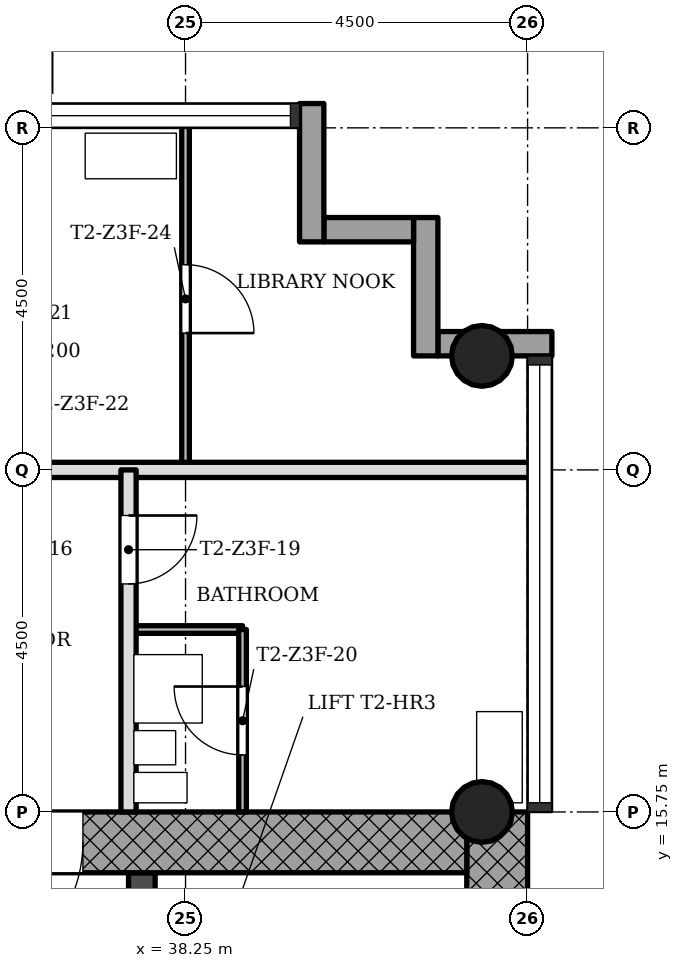
"""IFC4 building model, lengths in metres.
Left out: names, types, materials, properties, quantities, classifications, styles, units other than length and angle.
Written with IfcOpenShell. Run it as: python <this file> out.ifc"""

import sys

from ifc_helpers import new_model, si_unit, direction, frame, frame_2d, origin, origin_2d, place, context, subcontext, project, spatial, rectangle, hollow_circle, extrude, element, fill, save


model = new_model("IFC4")
c1 = context("Model", 3, precision=1e-05, world=origin(), true_north=direction((0.0, 1.0)))
c2 = subcontext(c1, "Body", "Model", "MODEL_VIEW")
j1 = project(units=[si_unit("LENGTHUNIT", "METRE"), si_unit("PLANEANGLEUNIT", "RADIAN")], contexts=[c1])
p1 = place(None, origin())
s1 = spatial("IfcSite", under=j1, at=p1, CompositionType="ELEMENT")
p2 = place(p1, origin())
s2 = spatial("IfcBuilding", under=s1, at=p2, CompositionType="ELEMENT")
p3 = place(p2, frame((0.0, 0.0, 167.7)))
s3 = spatial("IfcBuildingStorey", under=s2, at=p3, CompositionType="ELEMENT", Elevation=167.7)
p4 = place(p3, frame((42.35, 7.55, 0.0), z_axis=(0.0, 0.0, 1.0), x_axis=(0.0, 1.0, 0.0)))
e1 = element("IfcWall", 1, at=p4, inside=s3, PredefinedType="SHEAR", context=c2, shape_type="SweptSolid", body=[
    extrude(rectangle(XDim=8.2, YDim=0.8, at=frame_2d((4.1, 0.0))), origin(), (0.0, 0.0, 1.0), 3.4),
])
p5 = place(p3, frame((41.95, 15.35, 0.0), z_axis=(0.0, 0.0, 1.0), x_axis=(-1.0, 0.0, 0.0)))
e2 = element("IfcWall", 2, at=p5, inside=s3, PredefinedType="SHEAR", context=c2, shape_type="SweptSolid", body=[
    extrude(rectangle(XDim=12.7, YDim=0.8, at=frame_2d((6.35, 0.0))), origin(), (0.0, 0.0, 1.0), 3.4),
])
p6 = place(p5, frame((5.05, 0.0, 0.0)))
e3 = element("IfcOpeningElement", 3, at=p6, cuts=e2, PredefinedType="OPENING", context=c2, shape_type="SweptSolid", body=[
    extrude(rectangle(XDim=1.8, YDim=2.1, at=frame_2d((0.9, 1.05))), frame((0.0, 0.41, 0.0), z_axis=(0.0, -1.0, 0.0), x_axis=(1.0, 0.0, 0.0)), (0.0, 0.0, 1.0), 0.82),
])
p7 = place(p3, frame((37.675, 7.55, 0.0), z_axis=(0.0, 0.0, 1.0), x_axis=(0.0, 1.0, 0.0)))
e4 = element("IfcWall", 4, at=p7, inside=s3, PredefinedType="SHEAR", context=c2, shape_type="SweptSolid", body=[
    extrude(rectangle(XDim=7.4, YDim=0.35, at=frame_2d((3.7, 0.0))), origin(), (0.0, 0.0, 1.0), 3.4),
])
p8 = place(p7, frame((0.95, 0.0, 0.0)))
e5 = element("IfcOpeningElement", 5, at=p8, cuts=e4, PredefinedType="OPENING", context=c2, shape_type="SweptSolid", body=[
    extrude(rectangle(XDim=1.1, YDim=2.1, at=frame_2d((0.55, 1.05))), frame((0.0, 0.185, 0.0), z_axis=(0.0, -1.0, 0.0), x_axis=(1.0, 0.0, 0.0)), (0.0, 0.0, 1.0), 0.37),
])
p9 = place(p7, frame((3.15, 0.0, 0.0)))
e6 = element("IfcOpeningElement", 6, at=p9, cuts=e4, PredefinedType="OPENING", context=c2, shape_type="SweptSolid", body=[
    extrude(rectangle(XDim=1.1, YDim=2.1, at=frame_2d((0.55, 1.05))), frame((0.0, 0.185, 0.0), z_axis=(0.0, -1.0, 0.0), x_axis=(1.0, 0.0, 0.0)), (0.0, 0.0, 1.0), 0.37),
])
p10 = place(p7, frame((5.35, 0.0, 0.0)))
e7 = element("IfcOpeningElement", 7, at=p10, cuts=e4, PredefinedType="OPENING", context=c2, shape_type="SweptSolid", body=[
    extrude(rectangle(XDim=1.1, YDim=2.1, at=frame_2d((0.55, 1.05))), frame((0.0, 0.185, 0.0), z_axis=(0.0, -1.0, 0.0), x_axis=(1.0, 0.0, 0.0)), (0.0, 0.0, 1.0), 0.37),
])
for number, where, z_axis, x_axis in (
    (8, (42.15, 15.75, 0.0), (0.0, 0.0, 1.0), (1.0, 0.0, 0.0)),
    (9, (42.15, 21.75, 0.0), (0.0, 0.0, 1.0), (1.0, 0.0, 0.0)),
):
    element("IfcColumn", number, at=place(p3, frame(where, z_axis=z_axis, x_axis=x_axis)), inside=s3, PredefinedType="COLUMN", context=c2, shape_type="SweptSolid", body=[
        extrude(hollow_circle(Radius=0.4, WallThickness=0.028, at=origin_2d()), origin(), (0.0, 0.0, 1.0), 3.4),
    ])
p11 = place(p3, frame((43.07, 21.91, -0.3), z_axis=(0.0, 0.0, 1.0), x_axis=(-1.0, 0.0, 0.0)))
e10 = element("IfcWall", 10, at=p11, inside=s3, PredefinedType="STANDARD", context=c2, shape_type="SweptSolid", body=[
    extrude(rectangle(XDim=1.5, YDim=0.32, at=frame_2d((0.75, 0.0))), origin(), (0.0, 0.0, 1.0), 3.4),
])
p12 = place(p3, frame((41.41, 21.75, -0.3), z_axis=(0.0, 0.0, 1.0), x_axis=(0.0, 1.0, 0.0)))
e11 = element("IfcWall", 11, at=p12, inside=s3, PredefinedType="STANDARD", context=c2, shape_type="SweptSolid", body=[
    extrude(rectangle(XDim=1.82, YDim=0.32, at=frame_2d((0.91, 0.0))), origin(), (0.0, 0.0, 1.0), 3.4),
])
p13 = place(p3, frame((41.25, 23.41, -0.3), z_axis=(0.0, 0.0, 1.0), x_axis=(-1.0, 0.0, 0.0)))
e12 = element("IfcWall", 12, at=p13, inside=s3, PredefinedType="STANDARD", context=c2, shape_type="SweptSolid", body=[
    extrude(rectangle(XDim=1.18, YDim=0.32, at=frame_2d((0.59, 0.0))), origin(), (0.0, 0.0, 1.0), 3.4),
])
p14 = place(p3, frame((39.91, 23.25, -0.3), z_axis=(0.0, 0.0, 1.0), x_axis=(0.0, 1.0, 0.0)))
e13 = element("IfcWall", 13, at=p14, inside=s3, PredefinedType="STANDARD", context=c2, shape_type="SweptSolid", body=[
    extrude(rectangle(XDim=1.82, YDim=0.32, at=frame_2d((0.91, 0.0))), origin(), (0.0, 0.0, 1.0), 3.4),
])
p15 = place(p3, frame((39.0, 18.15, 0.0), z_axis=(0.0, 0.0, 1.0), x_axis=(-1.0, 0.0, 0.0)))
e14 = element("IfcWall", 14, at=p15, inside=s3, PredefinedType="PARTITIONING", context=c2, shape_type="SweptSolid", body=[
    extrude(rectangle(XDim=1.5, YDim=0.1, at=frame_2d((0.75, 0.0))), origin(), (0.0, 0.0, 1.0), 3.0),
])
p16 = place(p3, frame((42.85, 20.25, 0.0), z_axis=(0.0, 0.0, 1.0), x_axis=(-1.0, 0.0, 0.0)))
e15 = element("IfcWall", 15, at=p16, inside=s3, PredefinedType="SOLIDWALL", context=c2, shape_type="SweptSolid", body=[
    extrude(rectangle(XDim=13.7, YDim=0.2, at=frame_2d((6.85, 0.0))), origin(), (0.0, 0.0, 1.0), 3.0),
])
p17 = place(p16, frame((6.4, 0.0, 0.0)))
e16 = element("IfcOpeningElement", 16, at=p17, cuts=e15, PredefinedType="OPENING", context=c2, shape_type="SweptSolid", body=[
    extrude(rectangle(XDim=0.9, YDim=2.1, at=frame_2d((0.45, 1.05))), frame((0.0, 0.11, 0.0), z_axis=(0.0, -1.0, 0.0), x_axis=(1.0, 0.0, 0.0)), (0.0, 0.0, 1.0), 0.22),
])
p18 = place(p3, frame((39.0, 15.75, 0.0), z_axis=(0.0, 0.0, 1.0), x_axis=(0.0, 1.0, 0.0)))
e17 = element("IfcWall", 17, at=p18, inside=s3, PredefinedType="PARTITIONING", context=c2, shape_type="SweptSolid", body=[
    extrude(rectangle(XDim=2.4, YDim=0.1, at=frame_2d((1.2, 0.0))), origin(), (0.0, 0.0, 1.0), 3.0),
])
p19 = place(p18, frame((0.75, 0.0, 0.0)))
e18 = element("IfcOpeningElement", 18, at=p19, cuts=e17, PredefinedType="OPENING", context=c2, shape_type="SweptSolid", body=[
    extrude(rectangle(XDim=0.9, YDim=2.1, at=frame_2d((0.45, 1.05))), frame((0.0, 0.06, 0.0), z_axis=(0.0, -1.0, 0.0), x_axis=(1.0, 0.0, 0.0)), (0.0, 0.0, 1.0), 0.12),
])
p20 = place(p3, frame((38.25, 20.25, 0.0), z_axis=(0.0, 0.0, 1.0), x_axis=(0.0, 1.0, 0.0)))
e19 = element("IfcWall", 19, at=p20, inside=s3, PredefinedType="PARTITIONING", context=c2, shape_type="SweptSolid", body=[
    extrude(rectangle(XDim=4.6, YDim=0.1, at=frame_2d((2.3, 0.0))), origin(), (0.0, 0.0, 1.0), 3.0),
])
p21 = place(p20, frame((1.8, 0.0, 0.0)))
e20 = element("IfcOpeningElement", 20, at=p21, cuts=e19, PredefinedType="OPENING", context=c2, shape_type="SweptSolid", body=[
    extrude(rectangle(XDim=0.9, YDim=2.1, at=frame_2d((0.45, 1.05))), frame((0.0, 0.06, 0.0), z_axis=(0.0, -1.0, 0.0), x_axis=(1.0, 0.0, 0.0)), (0.0, 0.0, 1.0), 0.12),
])
p22 = place(p3, frame((37.5, 15.75, 0.0), z_axis=(0.0, 0.0, 1.0), x_axis=(0.0, 1.0, 0.0)))
e21 = element("IfcWall", 21, at=p22, inside=s3, PredefinedType="SOLIDWALL", context=c2, shape_type="SweptSolid", body=[
    extrude(rectangle(XDim=4.5, YDim=0.2, at=frame_2d((2.25, 0.0))), origin(), (0.0, 0.0, 1.0), 3.0),
])
p23 = place(p22, frame((3.0, 0.0, 0.0)))
e22 = element("IfcOpeningElement", 22, at=p23, cuts=e21, PredefinedType="OPENING", context=c2, shape_type="SweptSolid", body=[
    extrude(rectangle(XDim=0.9, YDim=2.1, at=frame_2d((0.45, 1.05))), frame((0.0, 0.11, 0.0), z_axis=(0.0, -1.0, 0.0), x_axis=(1.0, 0.0, 0.0)), (0.0, 0.0, 1.0), 0.22),
])
p24 = place(p23, origin())
e23 = element("IfcDoor", 23, at=p24, inside=s3, OperationType="SINGLE_SWING_RIGHT", PredefinedType="DOOR", context=c2, shape_type="SweptSolid", body=[
    extrude(rectangle(XDim=0.9, YDim=2.1, at=frame_2d((0.45, 1.05))), frame((0.0, 0.025, 0.0), z_axis=(0.0, -1.0, 0.0), x_axis=(1.0, 0.0, 0.0)), (0.0, 0.0, 1.0), 0.05),
])
fill(e22, e23)
p25 = place(p19, origin())
e24 = element("IfcDoor", 24, at=p25, inside=s3, OperationType="SINGLE_SWING_LEFT", PredefinedType="DOOR", context=c2, shape_type="SweptSolid", body=[
    extrude(rectangle(XDim=0.9, YDim=2.1, at=frame_2d((0.45, 1.05))), frame((0.0, 0.025, 0.0), z_axis=(0.0, -1.0, 0.0), x_axis=(1.0, 0.0, 0.0)), (0.0, 0.0, 1.0), 0.05),
])
fill(e18, e24)
p26 = place(p21, origin())
e25 = element("IfcDoor", 25, at=p26, inside=s3, OperationType="SINGLE_SWING_LEFT", PredefinedType="DOOR", context=c2, shape_type="SweptSolid", body=[
    extrude(rectangle(XDim=0.9, YDim=2.1, at=frame_2d((0.45, 1.05))), frame((0.0, 0.025, 0.0), z_axis=(0.0, -1.0, 0.0), x_axis=(1.0, 0.0, 0.0)), (0.0, 0.0, 1.0), 0.05),
])
fill(e20, e25)
p27 = place(p6, origin())
e26 = element("IfcDoor", 26, at=p27, inside=s3, OperationType="SINGLE_SWING_LEFT", PredefinedType="DOOR", context=c2, shape_type="SweptSolid", body=[
    extrude(rectangle(XDim=1.8, YDim=2.1, at=frame_2d((0.9, 1.05))), frame((0.0, 0.025, 0.0), z_axis=(0.0, -1.0, 0.0), x_axis=(1.0, 0.0, 0.0)), (0.0, 0.0, 1.0), 0.05),
])
fill(e3, e26)
save(model, sys.argv[1])
